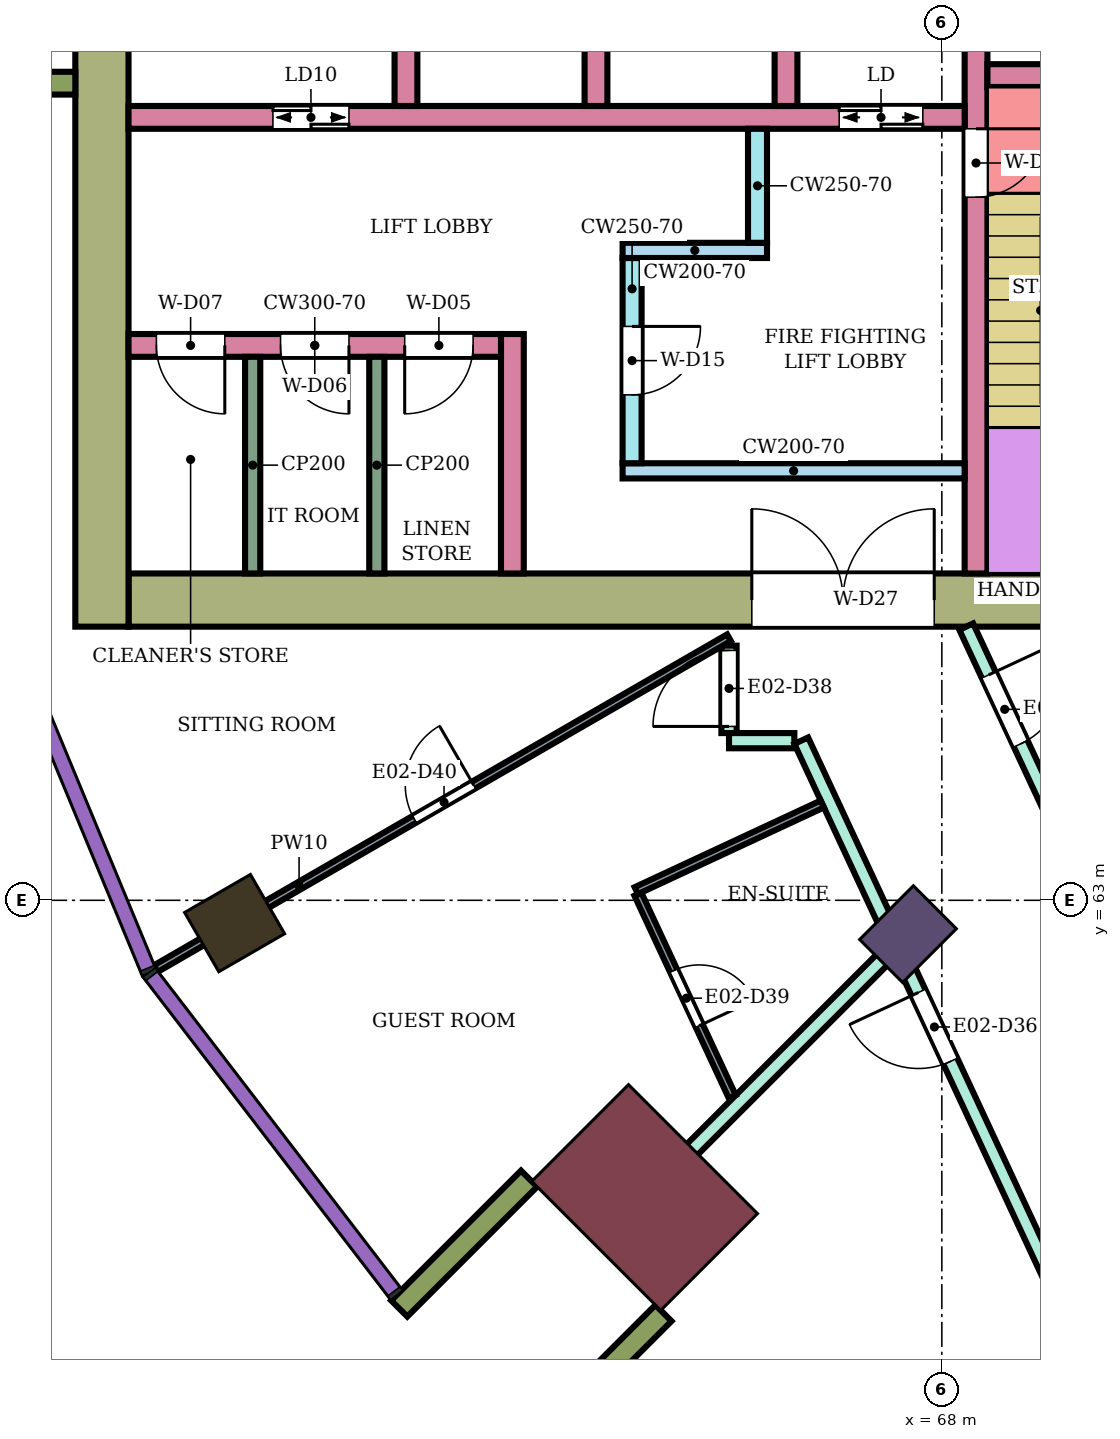
"""IFC4 building model, lengths in metres.
Left out: names, types, materials, properties, quantities, classifications, styles, units other than length and angle.
Written with IfcOpenShell. Run it as: python <this file> out.ifc"""

import sys

from ifc_helpers import new_model, si_unit, direction, frame, frame_2d, origin, origin_2d, place, context, subcontext, project, spatial, rectangle, extrude, element, fill, save


model = new_model("IFC4")
c1 = context("Model", 3, precision=1e-05, world=origin(), true_north=direction((0.0, 1.0)))
c2 = subcontext(c1, "Body", "Model", "MODEL_VIEW")
j1 = project(units=[si_unit("LENGTHUNIT", "METRE"), si_unit("PLANEANGLEUNIT", "RADIAN")], contexts=[c1])
p1 = place(None, origin())
s1 = spatial("IfcSite", under=j1, at=p1, CompositionType="ELEMENT")
p2 = place(p1, origin())
s2 = spatial("IfcBuilding", under=s1, at=p2, CompositionType="ELEMENT")
p3 = place(p2, frame((0.0, 0.0, 130.2)))
s3 = spatial("IfcBuildingStorey", under=s2, at=p3, CompositionType="ELEMENT", Elevation=130.2)
p4 = place(p3, frame((58.696, 62.7, 0.0), z_axis=(0.0, 0.0, 1.0), x_axis=(-0.866025403784, -0.5, 0.0)))
e1 = element("IfcColumn", 1, at=p4, inside=s3, PredefinedType="COLUMN", context=c2, shape_type="SweptSolid", body=[
    extrude(rectangle(XDim=1.0, YDim=0.9, at=origin_2d()), origin(), (0.0, 0.0, 1.0), 3.9),
])
p5 = place(p3, frame((67.555, 62.555, 0.0), z_axis=(0.0, 0.0, 1.0), x_axis=(-0.707106781187, -0.707106781187, 0.0)))
e2 = element("IfcColumn", 2, at=p5, inside=s3, PredefinedType="COLUMN", context=c2, shape_type="SweptSolid", body=[
    extrude(rectangle(XDim=1.0, YDim=0.8, at=origin_2d()), origin(), (0.0, 0.0, 1.0), 3.9),
])
p6 = place(p3, frame((64.09, 59.09, 0.0), z_axis=(0.0, 0.0, 1.0), x_axis=(-0.707106781187, -0.707106781187, 0.0)))
e3 = element("IfcColumn", 3, at=p6, inside=s3, PredefinedType="COLUMN", context=c2, shape_type="SweptSolid", body=[
    extrude(rectangle(XDim=1.8, YDim=2.4, at=origin_2d()), origin(), (0.0, 0.0, 1.0), 3.9),
])
p7 = place(p3, frame((72.1, 66.95, 0.0), z_axis=(0.0, 0.0, 1.0), x_axis=(-1.0, 0.0, 0.0)))
e4 = element("IfcWall", 4, at=p7, inside=s3, PredefinedType="SHEAR", context=c2, shape_type="SweptSolid", body=[
    extrude(rectangle(XDim=14.8, YDim=0.7, at=frame_2d((7.4, 0.0))), origin(), (0.0, 0.0, 1.0), 3.58),
])
p8 = place(p7, frame((4.2, 0.0, 0.0)))
e5 = element("IfcOpeningElement", 5, at=p8, cuts=e4, PredefinedType="OPENING", context=c2, shape_type="SweptSolid", body=[
    extrude(rectangle(XDim=2.4, YDim=2.4, at=frame_2d((1.2, 1.2))), frame((0.0, 0.36, 0.0), z_axis=(0.0, -1.0, 0.0), x_axis=(1.0, 0.0, 0.0)), (0.0, 0.0, 1.0), 0.72),
])
p9 = place(p3, frame((56.95, 83.4, 0.0), z_axis=(0.0, 0.0, 1.0), x_axis=(0.0, -1.0, 0.0)))
e6 = element("IfcWall", 6, at=p9, inside=s3, PredefinedType="SHEAR", context=c2, shape_type="SweptSolid", body=[
    extrude(rectangle(XDim=16.8, YDim=0.7, at=frame_2d((8.4, 0.0))), origin(), (0.0, 0.0, 1.0), 3.58),
])
p10 = place(p3, frame((68.45, 75.0, 0.0), z_axis=(0.0, 0.0, 1.0), x_axis=(0.0, -1.0, 0.0)))
e7 = element("IfcWall", 7, at=p10, inside=s3, PredefinedType="SHEAR", context=c2, shape_type="SweptSolid", body=[
    extrude(rectangle(XDim=7.7, YDim=0.3, at=frame_2d((3.85, 0.0))), origin(), (0.0, 0.0, 1.0), 3.58),
])
p11 = place(p10, frame((1.85, 0.0, 0.0)))
e8 = element("IfcOpeningElement", 8, at=p11, cuts=e7, PredefinedType="OPENING", context=c2, shape_type="SweptSolid", body=[
    extrude(rectangle(XDim=0.9, YDim=2.1, at=frame_2d((0.45, 1.05))), frame((0.0, 0.16, 0.0), z_axis=(0.0, -1.0, 0.0), x_axis=(1.0, 0.0, 0.0)), (0.0, 0.0, 1.0), 0.32),
])
p12 = place(p3, frame((71.65, 73.85, 0.0), z_axis=(0.0, 0.0, 1.0), x_axis=(-1.0, 0.0, 0.0)))
e9 = element("IfcWall", 9, at=p12, inside=s3, PredefinedType="SHEAR", context=c2, shape_type="SweptSolid", body=[
    extrude(rectangle(XDim=3.05, YDim=0.3, at=frame_2d((1.525, 0.0))), origin(), (0.0, 0.0, 1.0), 3.58),
])
p13 = place(p12, frame((1.1, 0.0, 0.0)))
e10 = element("IfcOpeningElement", 10, at=p13, cuts=e9, PredefinedType="OPENING", context=c2, shape_type="SweptSolid", body=[
    extrude(rectangle(XDim=0.7, YDim=2.0, at=frame_2d((0.35, 1.0))), frame((0.0, 0.16, 0.0), z_axis=(0.0, -1.0, 0.0), x_axis=(1.0, 0.0, 0.0)), (0.0, 0.0, 1.0), 0.32),
])
p14 = place(p3, frame((68.3, 73.3, 0.0), z_axis=(0.0, 0.0, 1.0), x_axis=(-1.0, 0.0, 0.0)))
e11 = element("IfcWall", 11, at=p14, inside=s3, PredefinedType="SHEAR", context=c2, shape_type="SweptSolid", body=[
    extrude(rectangle(XDim=11.0, YDim=0.3, at=frame_2d((5.5, 0.0))), origin(), (0.0, 0.0, 1.0), 3.58),
])
p15 = place(p14, frame((0.55, 0.0, 0.0)))
e12 = element("IfcOpeningElement", 12, at=p15, cuts=e11, PredefinedType="OPENING", context=c2, shape_type="SweptSolid", body=[
    extrude(rectangle(XDim=1.1, YDim=2.1, at=frame_2d((0.55, 1.05))), frame((0.0, 0.16, 0.0), z_axis=(0.0, -1.0, 0.0), x_axis=(1.0, 0.0, 0.0)), (0.0, 0.0, 1.0), 0.32),
])
p16 = place(p14, frame((8.1, 0.0, 0.0)))
e13 = element("IfcOpeningElement", 13, at=p16, cuts=e11, PredefinedType="OPENING", context=c2, shape_type="SweptSolid", body=[
    extrude(rectangle(XDim=1.0, YDim=2.1, at=frame_2d((0.5, 1.05))), frame((0.0, 0.16, 0.0), z_axis=(0.0, -1.0, 0.0), x_axis=(1.0, 0.0, 0.0)), (0.0, 0.0, 1.0), 0.32),
])
for number, where, z_axis, x_axis in (
    (14, (65.95, 76.0, 0.0), (0.0, 0.0, 1.0), (0.0, -1.0, 0.0)),
    (15, (63.45, 76.0, 0.0), (0.0, 0.0, 1.0), (0.0, -1.0, 0.0)),
    (16, (60.95, 76.0, 0.0), (0.0, 0.0, 1.0), (0.0, -1.0, 0.0)),
):
    element("IfcWall", number, at=place(p3, frame(where, z_axis=z_axis, x_axis=x_axis)), inside=s3, PredefinedType="SHEAR", context=c2, shape_type="SweptSolid", body=[
        extrude(rectangle(XDim=2.55, YDim=0.3, at=frame_2d((1.275, 0.0))), origin(), (0.0, 0.0, 1.0), 3.58),
    ])
p17 = place(p3, frame((68.3, 68.65, 0.0), z_axis=(0.0, 0.0, 1.0), x_axis=(-1.0, 0.0, 0.0)))
e17 = element("IfcWall", 17, at=p17, inside=s3, PredefinedType="SHEAR", context=c2, shape_type="SweptSolid", body=[
    extrude(rectangle(XDim=4.5, YDim=0.2, at=frame_2d((2.25, 0.0))), origin(), (0.0, 0.0, 1.0), 3.58),
])
p18 = place(p3, frame((63.925, 71.45, 0.0), z_axis=(0.0, 0.0, 1.0), x_axis=(0.0, -1.0, 0.0)))
e18 = element("IfcWall", 18, at=p18, inside=s3, PredefinedType="SHEAR", context=c2, shape_type="SweptSolid", body=[
    extrude(rectangle(XDim=2.7, YDim=0.25, at=frame_2d((1.35, 0.0))), origin(), (0.0, 0.0, 1.0), 3.58),
])
p19 = place(p18, frame((0.9, 0.0, 0.0)))
e19 = element("IfcOpeningElement", 19, at=p19, cuts=e18, PredefinedType="OPENING", context=c2, shape_type="SweptSolid", body=[
    extrude(rectangle(XDim=0.9, YDim=2.1, at=frame_2d((0.45, 1.05))), frame((0.0, 0.135, 0.0), z_axis=(0.0, -1.0, 0.0), x_axis=(1.0, 0.0, 0.0)), (0.0, 0.0, 1.0), 0.27),
])
p20 = place(p3, frame((65.7, 71.55, 0.0), z_axis=(0.0, 0.0, 1.0), x_axis=(-1.0, 0.0, 0.0)))
e20 = element("IfcWall", 20, at=p20, inside=s3, PredefinedType="SHEAR", context=c2, shape_type="SweptSolid", body=[
    extrude(rectangle(XDim=1.9, YDim=0.2, at=frame_2d((0.95, 0.0))), origin(), (0.0, 0.0, 1.0), 3.58),
])
p21 = place(p3, frame((65.575, 73.15, 0.0), z_axis=(0.0, 0.0, 1.0), x_axis=(0.0, -1.0, 0.0)))
e21 = element("IfcWall", 21, at=p21, inside=s3, PredefinedType="SHEAR", context=c2, shape_type="SweptSolid", body=[
    extrude(rectangle(XDim=1.5, YDim=0.25, at=frame_2d((0.75, 0.0))), origin(), (0.0, 0.0, 1.0), 3.58),
])
p22 = place(p3, frame((62.35, 70.45, 0.0), z_axis=(0.0, 0.0, 1.0), x_axis=(0.0, -1.0, 0.0)))
e22 = element("IfcWall", 22, at=p22, inside=s3, PredefinedType="SHEAR", context=c2, shape_type="SweptSolid", body=[
    extrude(rectangle(XDim=3.15, YDim=0.3, at=frame_2d((1.575, 0.0))), origin(), (0.0, 0.0, 1.0), 3.58),
])
p23 = place(p3, frame((62.2, 70.3, 0.0), z_axis=(0.0, 0.0, 1.0), x_axis=(-1.0, 0.0, 0.0)))
e23 = element("IfcWall", 23, at=p23, inside=s3, PredefinedType="SHEAR", context=c2, shape_type="SweptSolid", body=[
    extrude(rectangle(XDim=4.9, YDim=0.3, at=frame_2d((2.45, 0.0))), origin(), (0.0, 0.0, 1.0), 3.58),
])
p24 = place(p23, frame((0.367, 0.0, 0.0)))
e24 = element("IfcOpeningElement", 24, at=p24, cuts=e23, PredefinedType="OPENING", context=c2, shape_type="SweptSolid", body=[
    extrude(rectangle(XDim=0.9, YDim=2.1, at=frame_2d((0.45, 1.05))), frame((0.0, 0.16, 0.0), z_axis=(0.0, -1.0, 0.0), x_axis=(1.0, 0.0, 0.0)), (0.0, 0.0, 1.0), 0.32),
])
p25 = place(p23, frame((2.0, 0.0, 0.0)))
e25 = element("IfcOpeningElement", 25, at=p25, cuts=e23, PredefinedType="OPENING", context=c2, shape_type="SweptSolid", body=[
    extrude(rectangle(XDim=0.9, YDim=2.1, at=frame_2d((0.45, 1.05))), frame((0.0, 0.16, 0.0), z_axis=(0.0, -1.0, 0.0), x_axis=(1.0, 0.0, 0.0)), (0.0, 0.0, 1.0), 0.32),
])
p26 = place(p23, frame((3.633, 0.0, 0.0)))
e26 = element("IfcOpeningElement", 26, at=p26, cuts=e23, PredefinedType="OPENING", context=c2, shape_type="SweptSolid", body=[
    extrude(rectangle(XDim=0.9, YDim=2.1, at=frame_2d((0.45, 1.05))), frame((0.0, 0.16, 0.0), z_axis=(0.0, -1.0, 0.0), x_axis=(1.0, 0.0, 0.0)), (0.0, 0.0, 1.0), 0.32),
])
for number, where, z_axis, x_axis in (
    (27, (56.6, 73.75, 0.0), (0.0, 0.0, 1.0), (-1.0, 0.0, 0.0)),
    (28, (62.57, 59.338, 0.0), (0.0, 0.0, 1.0), (-0.707, -0.707, 0.0)),
    (29, (64.338, 57.57, 0.0), (0.0, 0.0, 1.0), (-0.707, -0.707, 0.0)),
):
    element("IfcWall", number, at=place(p3, frame(where, z_axis=z_axis, x_axis=x_axis)), inside=s3, PredefinedType="NOTDEFINED", context=c2, shape_type="SweptSolid", body=[
        extrude(rectangle(XDim=2.416, YDim=0.3, at=frame_2d((1.208, 0.0))), origin(), (0.0, 0.0, 1.0), 3.9),
    ])
p27 = place(p3, frame((63.592, 58.599, 0.0), z_axis=(0.0, 0.0, 1.0), x_axis=(0.707292886396, 0.706920626982, 0.0)))
e30 = element("IfcWall", 30, at=p27, inside=s3, PredefinedType="PARTITIONING", context=c2, shape_type="SweptSolid", body=[
    extrude(rectangle(XDim=5.247, YDim=0.2, at=frame_2d((2.623, 0.0))), origin(), (0.0, 0.0, 1.0), 3.45),
])
p28 = place(p3, frame((65.2, 65.2, 0.0), z_axis=(0.0, 0.0, 1.0), x_axis=(0.0, 1.0, 0.0)))
e31 = element("IfcWall", 31, at=p28, inside=s3, PredefinedType="PARTITIONING", context=c2, shape_type="SweptSolid", body=[
    extrude(rectangle(XDim=1.15, YDim=0.2, at=frame_2d((0.575, 0.0))), origin(), (0.0, 0.0, 1.0), 3.45),
])
p29 = place(p28, frame((0.087, 0.0, 0.0)))
e32 = element("IfcOpeningElement", 32, at=p29, cuts=e31, PredefinedType="OPENING", context=c2, shape_type="SweptSolid", body=[
    extrude(rectangle(XDim=1.0, YDim=2.1, at=frame_2d((0.5, 1.05))), frame((0.0, 0.11, 0.0), z_axis=(0.0, -1.0, 0.0), x_axis=(1.0, 0.0, 0.0)), (0.0, 0.0, 1.0), 0.22),
])
p30 = place(p3, frame((65.2, 65.1, 0.0), z_axis=(0.0, 0.0, 1.0), x_axis=(1.0, 0.0, 0.0)))
e33 = element("IfcWall", 33, at=p30, inside=s3, PredefinedType="PARTITIONING", context=c2, shape_type="SweptSolid", body=[
    extrude(rectangle(XDim=0.86, YDim=0.2, at=frame_2d((0.43, 0.0))), origin(), (0.0, 0.0, 1.0), 3.45),
])
p31 = place(p3, frame((66.15, 65.1, 0.0), z_axis=(0.0, 0.0, 1.0), x_axis=(0.421814710342, -0.906682055706, 0.0)))
e34 = element("IfcWall", 34, at=p31, inside=s3, PredefinedType="PARTITIONING", context=c2, shape_type="SweptSolid", body=[
    extrude(rectangle(XDim=8.228, YDim=0.2, at=frame_2d((4.114, 0.0))), origin(), (0.0, 0.0, 1.0), 3.45),
])
p32 = place(p31, frame((3.654, 0.0, 0.0)))
e35 = element("IfcOpeningElement", 35, at=p32, cuts=e34, PredefinedType="OPENING", context=c2, shape_type="SweptSolid", body=[
    extrude(rectangle(XDim=1.0, YDim=2.1, at=frame_2d((0.5, 1.05))), frame((0.0, 0.11, 0.0), z_axis=(0.0, -1.0, 0.0), x_axis=(1.0, 0.0, 0.0)), (0.0, 0.0, 1.0), 0.22),
])
p33 = place(p3, frame((68.321, 66.6, 0.0), z_axis=(0.0, 0.0, 1.0), x_axis=(0.421914092414, -0.906635813666, 0.0)))
e36 = element("IfcWall", 36, at=p33, inside=s3, PredefinedType="PARTITIONING", context=c2, shape_type="SweptSolid", body=[
    extrude(rectangle(XDim=7.459, YDim=0.2, at=frame_2d((3.73, 0.0))), origin(), (0.0, 0.0, 1.0), 3.45),
])
p34 = place(p33, frame((0.7, 0.0, 0.0)))
e37 = element("IfcOpeningElement", 37, at=p34, cuts=e36, PredefinedType="OPENING", context=c2, shape_type="SweptSolid", body=[
    extrude(rectangle(XDim=1.0, YDim=2.1, at=frame_2d((0.5, 1.05))), frame((0.0, 0.11, 0.0), z_axis=(0.0, -1.0, 0.0), x_axis=(1.0, 0.0, 0.0)), (0.0, 0.0, 1.0), 0.22),
])
p35 = place(p3, frame((57.659, 62.101, 0.0), z_axis=(0.0, 0.0, 1.0), x_axis=(0.86602264145, 0.500004784474, 0.0)))
e38 = element("IfcWall", 38, at=p35, inside=s3, PredefinedType="PARTITIONING", context=c2, shape_type="SweptSolid", body=[
    extrude(rectangle(XDim=8.708, YDim=0.1, at=frame_2d((4.354, 0.0))), origin(), (0.0, 0.0, 1.0), 3.45),
])
p36 = place(p35, frame((3.929, 0.0, 0.0)))
e39 = element("IfcOpeningElement", 39, at=p36, cuts=e38, PredefinedType="OPENING", context=c2, shape_type="SweptSolid", body=[
    extrude(rectangle(XDim=0.9, YDim=2.1, at=frame_2d((0.45, 1.05))), frame((0.0, 0.06, 0.0), z_axis=(0.0, -1.0, 0.0), x_axis=(1.0, 0.0, 0.0)), (0.0, 0.0, 1.0), 0.12),
])
p37 = place(p3, frame((64.001, 63.082, 0.0), z_axis=(0.0, 0.0, 1.0), x_axis=(0.422271882089, -0.906469225951, 0.0)))
e40 = element("IfcWall", 40, at=p37, inside=s3, PredefinedType="PARTITIONING", context=c2, shape_type="SweptSolid", body=[
    extrude(rectangle(XDim=2.941, YDim=0.1, at=frame_2d((1.471, 0.0))), origin(), (0.0, 0.0, 1.0), 3.45),
])
p38 = place(p37, frame((1.111, 0.0, 0.0)))
e41 = element("IfcOpeningElement", 41, at=p38, cuts=e40, PredefinedType="OPENING", context=c2, shape_type="SweptSolid", body=[
    extrude(rectangle(XDim=0.8, YDim=2.1, at=frame_2d((0.4, 1.05))), frame((0.0, 0.06, 0.0), z_axis=(0.0, -1.0, 0.0), x_axis=(1.0, 0.0, 0.0)), (0.0, 0.0, 1.0), 0.12),
])
p39 = place(p3, frame((63.98, 63.127, 0.0), z_axis=(0.0, 0.0, 1.0), x_axis=(0.90649017149, 0.422226916469, 0.0)))
e42 = element("IfcWall", 42, at=p39, inside=s3, PredefinedType="PARTITIONING", context=c2, shape_type="SweptSolid", body=[
    extrude(rectangle(XDim=2.7, YDim=0.1, at=frame_2d((1.35, 0.0))), origin(), (0.0, 0.0, 1.0), 3.45),
])
for number, where, z_axis, x_axis in (
    (43, (60.567, 70.15, 0.0), (0.0, 0.0, 1.0), (0.0, -1.0, 0.0)),
    (44, (58.933, 70.15, 0.0), (0.0, 0.0, 1.0), (0.0, -1.0, 0.0)),
):
    element("IfcWall", number, at=place(p3, frame(where, z_axis=z_axis, x_axis=x_axis)), inside=s3, PredefinedType="PARTITIONING", context=c2, shape_type="SweptSolid", body=[
        extrude(rectangle(XDim=2.85, YDim=0.2, at=frame_2d((1.425, 0.0))), origin(), (0.0, 0.0, 1.0), 3.58),
    ])
p40 = place(p32, frame((1.0, 0.0, 0.0), z_axis=(0.0, 0.0, 1.0), x_axis=(-1.0, 0.0, 0.0)))
e45 = element("IfcDoor", 45, at=p40, inside=s3, OperationType="SINGLE_SWING_RIGHT", PredefinedType="DOOR", context=c2, shape_type="SweptSolid", body=[
    extrude(rectangle(XDim=1.0, YDim=2.1, at=frame_2d((0.5, 1.05))), frame((0.0, 0.025, 0.0), z_axis=(0.0, -1.0, 0.0), x_axis=(1.0, 0.0, 0.0)), (0.0, 0.0, 1.0), 0.05),
])
fill(e35, e45)
p41 = place(p29, origin())
e46 = element("IfcDoor", 46, at=p41, inside=s3, OperationType="SINGLE_SWING_LEFT", PredefinedType="DOOR", context=c2, shape_type="SweptSolid", body=[
    extrude(rectangle(XDim=1.0, YDim=2.1, at=frame_2d((0.5, 1.05))), frame((0.0, 0.025, 0.0), z_axis=(0.0, -1.0, 0.0), x_axis=(1.0, 0.0, 0.0)), (0.0, 0.0, 1.0), 0.05),
])
fill(e32, e46)
p42 = place(p38, origin())
e47 = element("IfcDoor", 47, at=p42, inside=s3, OperationType="SINGLE_SWING_RIGHT", PredefinedType="DOOR", context=c2, shape_type="SweptSolid", body=[
    extrude(rectangle(XDim=0.8, YDim=2.1, at=frame_2d((0.4, 1.05))), frame((0.0, 0.025, 0.0), z_axis=(0.0, -1.0, 0.0), x_axis=(1.0, 0.0, 0.0)), (0.0, 0.0, 1.0), 0.05),
])
fill(e41, e47)
p43 = place(p36, origin())
e48 = element("IfcDoor", 48, at=p43, inside=s3, OperationType="SINGLE_SWING_RIGHT", PredefinedType="DOOR", context=c2, shape_type="SweptSolid", body=[
    extrude(rectangle(XDim=0.9, YDim=2.1, at=frame_2d((0.45, 1.05))), frame((0.0, 0.025, 0.0), z_axis=(0.0, -1.0, 0.0), x_axis=(1.0, 0.0, 0.0)), (0.0, 0.0, 1.0), 0.05),
])
fill(e39, e48)
p44 = place(p34, origin())
e49 = element("IfcDoor", 49, at=p44, inside=s3, OperationType="SINGLE_SWING_LEFT", PredefinedType="DOOR", context=c2, shape_type="SweptSolid", body=[
    extrude(rectangle(XDim=1.0, YDim=2.1, at=frame_2d((0.5, 1.05))), frame((0.0, 0.025, 0.0), z_axis=(0.0, -1.0, 0.0), x_axis=(1.0, 0.0, 0.0)), (0.0, 0.0, 1.0), 0.05),
])
fill(e37, e49)
p45 = place(p11, origin())
e50 = element("IfcDoor", 50, at=p45, inside=s3, OperationType="SINGLE_SWING_LEFT", PredefinedType="DOOR", context=c2, shape_type="SweptSolid", body=[
    extrude(rectangle(XDim=0.9, YDim=2.1, at=frame_2d((0.45, 1.05))), frame((0.0, 0.025, 0.0), z_axis=(0.0, -1.0, 0.0), x_axis=(1.0, 0.0, 0.0)), (0.0, 0.0, 1.0), 0.05),
])
fill(e8, e50)
p46 = place(p15, origin())
e51 = element("IfcDoor", 51, at=p46, inside=s3, OperationType="DOUBLE_DOOR_SLIDING", PredefinedType="DOOR", context=c2, shape_type="SweptSolid", body=[
    extrude(rectangle(XDim=1.1, YDim=2.1, at=frame_2d((0.55, 1.05))), frame((0.0, 0.025, 0.0), z_axis=(0.0, -1.0, 0.0), x_axis=(1.0, 0.0, 0.0)), (0.0, 0.0, 1.0), 0.05),
])
fill(e12, e51)
p47 = place(p16, origin())
e52 = element("IfcDoor", 52, at=p47, inside=s3, OperationType="DOUBLE_DOOR_SLIDING", PredefinedType="DOOR", context=c2, shape_type="SweptSolid", body=[
    extrude(rectangle(XDim=1.0, YDim=2.1, at=frame_2d((0.5, 1.05))), frame((0.0, 0.025, 0.0), z_axis=(0.0, -1.0, 0.0), x_axis=(1.0, 0.0, 0.0)), (0.0, 0.0, 1.0), 0.05),
])
fill(e13, e52)
p48 = place(p19, origin())
e53 = element("IfcDoor", 53, at=p48, inside=s3, OperationType="SINGLE_SWING_LEFT", PredefinedType="DOOR", context=c2, shape_type="SweptSolid", body=[
    extrude(rectangle(XDim=0.9, YDim=2.1, at=frame_2d((0.45, 1.05))), frame((0.0, 0.025, 0.0), z_axis=(0.0, -1.0, 0.0), x_axis=(1.0, 0.0, 0.0)), (0.0, 0.0, 1.0), 0.05),
])
fill(e19, e53)
p49 = place(p24, origin())
e54 = element("IfcDoor", 54, at=p49, inside=s3, OperationType="SINGLE_SWING_RIGHT", PredefinedType="DOOR", context=c2, shape_type="SweptSolid", body=[
    extrude(rectangle(XDim=0.9, YDim=2.1, at=frame_2d((0.45, 1.05))), frame((0.0, 0.025, 0.0), z_axis=(0.0, -1.0, 0.0), x_axis=(1.0, 0.0, 0.0)), (0.0, 0.0, 1.0), 0.05),
])
fill(e24, e54)
p50 = place(p25, origin())
e55 = element("IfcDoor", 55, at=p50, inside=s3, OperationType="SINGLE_SWING_LEFT", PredefinedType="DOOR", context=c2, shape_type="SweptSolid", body=[
    extrude(rectangle(XDim=0.9, YDim=2.1, at=frame_2d((0.45, 1.05))), frame((0.0, 0.025, 0.0), z_axis=(0.0, -1.0, 0.0), x_axis=(1.0, 0.0, 0.0)), (0.0, 0.0, 1.0), 0.05),
])
fill(e25, e55)
p51 = place(p26, origin())
e56 = element("IfcDoor", 56, at=p51, inside=s3, OperationType="SINGLE_SWING_LEFT", PredefinedType="DOOR", context=c2, shape_type="SweptSolid", body=[
    extrude(rectangle(XDim=0.9, YDim=2.1, at=frame_2d((0.45, 1.05))), frame((0.0, 0.025, 0.0), z_axis=(0.0, -1.0, 0.0), x_axis=(1.0, 0.0, 0.0)), (0.0, 0.0, 1.0), 0.05),
])
fill(e26, e56)
p52 = place(p8, frame((2.4, 0.0, 0.0), z_axis=(0.0, 0.0, 1.0), x_axis=(-1.0, 0.0, 0.0)))
e57 = element("IfcDoor", 57, at=p52, inside=s3, OperationType="DOUBLE_DOOR_SINGLE_SWING", PredefinedType="DOOR", context=c2, shape_type="SweptSolid", body=[
    extrude(rectangle(XDim=2.4, YDim=2.4, at=frame_2d((1.2, 1.2))), frame((0.0, 0.025, 0.0), z_axis=(0.0, -1.0, 0.0), x_axis=(1.0, 0.0, 0.0)), (0.0, 0.0, 1.0), 0.05),
])
fill(e5, e57)
save(model, sys.argv[1])
